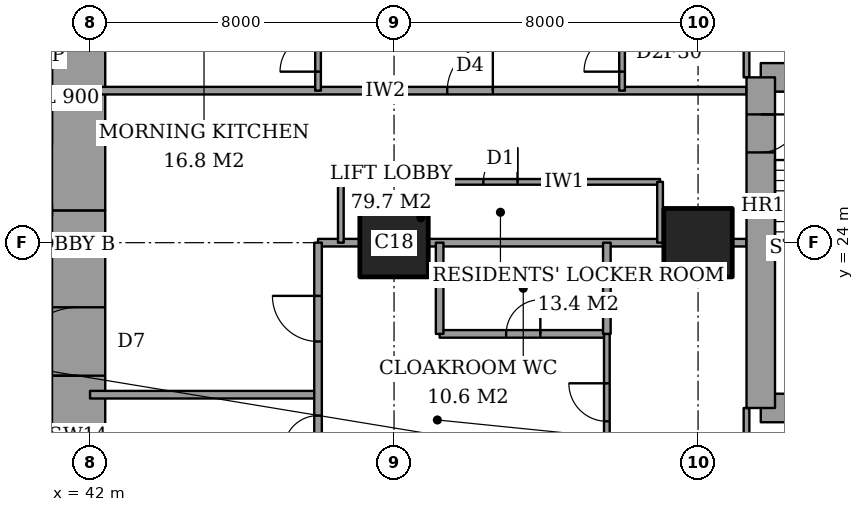
"""IFC4 building model, lengths in metres.
Left out: names, types, materials, properties, quantities, classifications, styles, units other than length and angle.
Written with IfcOpenShell. Run it as: python <this file> out.ifc"""

import sys

from ifc_helpers import new_model, si_unit, direction, frame, frame_2d, origin, origin_2d, place, context, subcontext, project, spatial, rectangle, extrude, element, fill, save


model = new_model("IFC4")
c1 = context("Model", 3, precision=1e-05, world=origin(), true_north=direction((0.0, 1.0)))
c2 = subcontext(c1, "Body", "Model", "MODEL_VIEW")
j1 = project(units=[si_unit("LENGTHUNIT", "METRE"), si_unit("PLANEANGLEUNIT", "RADIAN")], contexts=[c1])
p1 = place(None, origin())
s1 = spatial("IfcSite", under=j1, at=p1, CompositionType="ELEMENT")
p2 = place(p1, origin())
s2 = spatial("IfcBuilding", under=s1, at=p2, CompositionType="ELEMENT")
p3 = place(p2, frame((0.0, 0.0, 207.4)))
s3 = spatial("IfcBuildingStorey", under=s2, at=p3, CompositionType="ELEMENT", Elevation=207.4)
for number, where, z_axis, x_axis in (
    (1, (50.0, 24.0, 0.0), (0.0, 0.0, 1.0), (1.0, 0.0, 0.0)),
    (2, (58.0, 24.0, 0.0), (0.0, 0.0, 1.0), (1.0, 0.0, 0.0)),
):
    element("IfcColumn", number, at=place(p3, frame(where, z_axis=z_axis, x_axis=x_axis)), inside=s3, PredefinedType="COLUMN", context=c2, shape_type="SweptSolid", body=[
        extrude(rectangle(XDim=1.8, YDim=1.8, at=origin_2d()), origin(), (0.0, 0.0, 1.0), 3.6),
    ])
p4 = place(p3, frame((41.7, 13.0, 0.0), z_axis=(0.0, 0.0, 1.0), x_axis=(0.0, 1.0, 0.0)))
e3 = element("IfcWall", 3, at=p4, inside=s3, PredefinedType="SHEAR", context=c2, shape_type="SweptSolid", body=[
    extrude(rectangle(XDim=11.85, YDim=1.4, at=frame_2d((5.925, 0.0))), origin(), (0.0, 0.0, 1.0), 3.6),
])
p5 = place(p4, frame((7.5, 0.0, 0.0)))
e4 = element("IfcOpeningElement", 4, at=p5, cuts=e3, PredefinedType="OPENING", context=c2, shape_type="SweptSolid", body=[
    extrude(rectangle(XDim=1.8, YDim=2.4, at=frame_2d((0.9, 1.2))), frame((0.0, 0.71, 0.0), z_axis=(0.0, -1.0, 0.0), x_axis=(1.0, 0.0, 0.0)), (0.0, 0.0, 1.0), 1.42),
])
p6 = place(p3, frame((41.7, 24.85, 0.0), z_axis=(0.0, 0.0, 1.0), x_axis=(0.0, 1.0, 0.0)))
e5 = element("IfcWall", 5, at=p6, inside=s3, PredefinedType="SHEAR", context=c2, shape_type="SweptSolid", body=[
    extrude(rectangle(XDim=10.15, YDim=1.4, at=frame_2d((5.075, 0.0))), origin(), (0.0, 0.0, 1.0), 3.6),
])
for number, where, z_axis, x_axis in (
    (6, (59.65, 19.65, 0.0), (0.0, 0.0, 1.0), (1.0, 0.0, 0.0)),
    (7, (64.1, 28.35, 0.0), (0.0, 0.0, 1.0), (-1.0, 0.0, 0.0)),
):
    element("IfcWall", number, at=place(p3, frame(where, z_axis=z_axis, x_axis=x_axis)), inside=s3, PredefinedType="SHEAR", context=c2, shape_type="SweptSolid", body=[
        extrude(rectangle(XDim=4.45, YDim=0.75, at=frame_2d((2.225, 0.0))), origin(), (0.0, 0.0, 1.0), 3.6),
    ])
p7 = place(p3, frame((59.65, 28.35, 0.0), z_axis=(0.0, 0.0, 1.0), x_axis=(0.0, -1.0, 0.0)))
e8 = element("IfcWall", 8, at=p7, inside=s3, PredefinedType="SHEAR", context=c2, shape_type="SweptSolid", body=[
    extrude(rectangle(XDim=8.7, YDim=0.75, at=frame_2d((4.35, 0.0))), origin(), (0.0, 0.0, 1.0), 3.6),
])
p8 = place(p7, frame((0.975, 0.0, 0.0)))
e9 = element("IfcOpeningElement", 9, at=p8, cuts=e8, PredefinedType="OPENING", context=c2, shape_type="SweptSolid", body=[
    extrude(rectangle(XDim=1.0, YDim=2.1, at=frame_2d((0.5, 1.05))), frame((0.0, 0.385, 0.0), z_axis=(0.0, -1.0, 0.0), x_axis=(1.0, 0.0, 0.0)), (0.0, 0.0, 1.0), 0.77),
])
p9 = place(p3, frame((42.0, 20.0, 0.0), z_axis=(0.0, 0.0, 1.0), x_axis=(1.0, 0.0, 0.0)))
e10 = element("IfcWall", 10, at=p9, inside=s3, PredefinedType="PARTITIONING", context=c2, shape_type="SweptSolid", body=[
    extrude(rectangle(XDim=6.0, YDim=0.2, at=frame_2d((3.0, 0.0))), origin(), (0.0, 0.0, 1.0), 3.35),
])
p10 = place(p3, frame((51.2, 21.6, 0.0), z_axis=(0.0, 0.0, 1.0), x_axis=(1.0, 0.0, 0.0)))
e11 = element("IfcWall", 11, at=p10, inside=s3, PredefinedType="PARTITIONING", context=c2, shape_type="SweptSolid", body=[
    extrude(rectangle(XDim=4.4, YDim=0.2, at=frame_2d((2.2, 0.0))), origin(), (0.0, 0.0, 1.0), 3.35),
])
p11 = place(p10, frame((1.75, 0.0, 0.0)))
e12 = element("IfcOpeningElement", 12, at=p11, cuts=e11, PredefinedType="OPENING", context=c2, shape_type="SweptSolid", body=[
    extrude(rectangle(XDim=0.9, YDim=2.1, at=frame_2d((0.45, 1.05))), frame((0.0, 0.11, 0.0), z_axis=(0.0, -1.0, 0.0), x_axis=(1.0, 0.0, 0.0)), (0.0, 0.0, 1.0), 0.22),
])
p12 = place(p3, frame((48.0, 24.0, 0.0), z_axis=(0.0, 0.0, 1.0), x_axis=(1.0, 0.0, 0.0)))
e13 = element("IfcWall", 13, at=p12, inside=s3, PredefinedType="PARTITIONING", context=c2, shape_type="SweptSolid", body=[
    extrude(rectangle(XDim=1.1, YDim=0.2, at=frame_2d((0.55, 0.0))), origin(), (0.0, 0.0, 1.0), 3.35),
])
p13 = place(p3, frame((50.9, 24.0, 0.0), z_axis=(0.0, 0.0, 1.0), x_axis=(1.0, 0.0, 0.0)))
e14 = element("IfcWall", 14, at=p13, inside=s3, PredefinedType="PARTITIONING", context=c2, shape_type="SweptSolid", body=[
    extrude(rectangle(XDim=6.2, YDim=0.2, at=frame_2d((3.1, 0.0))), origin(), (0.0, 0.0, 1.0), 3.35),
])
p14 = place(p3, frame((58.9, 24.0, 0.0), z_axis=(0.0, 0.0, 1.0), x_axis=(1.0, 0.0, 0.0)))
e15 = element("IfcWall", 15, at=p14, inside=s3, PredefinedType="PARTITIONING", context=c2, shape_type="SweptSolid", body=[
    extrude(rectangle(XDim=0.375, YDim=0.2, at=frame_2d((0.188, 0.0))), origin(), (0.0, 0.0, 1.0), 3.35),
])
p15 = place(p3, frame((48.6, 25.6, 0.0), z_axis=(0.0, 0.0, 1.0), x_axis=(1.0, 0.0, 0.0)))
e16 = element("IfcWall", 16, at=p15, inside=s3, PredefinedType="PARTITIONING", context=c2, shape_type="SweptSolid", body=[
    extrude(rectangle(XDim=8.4, YDim=0.15, at=frame_2d((4.2, 0.0))), origin(), (0.0, 0.0, 1.0), 3.35),
])
p16 = place(p15, frame((3.75, 0.0, 0.0)))
e17 = element("IfcOpeningElement", 17, at=p16, cuts=e16, PredefinedType="OPENING", context=c2, shape_type="SweptSolid", body=[
    extrude(rectangle(XDim=0.9, YDim=2.1, at=frame_2d((0.45, 1.05))), frame((0.0, 0.085, 0.0), z_axis=(0.0, -1.0, 0.0), x_axis=(1.0, 0.0, 0.0)), (0.0, 0.0, 1.0), 0.17),
])
p17 = place(p3, frame((42.0, 28.0, 0.0), z_axis=(0.0, 0.0, 1.0), x_axis=(1.0, 0.0, 0.0)))
e18 = element("IfcWall", 18, at=p17, inside=s3, PredefinedType="PARTITIONING", context=c2, shape_type="SweptSolid", body=[
    extrude(rectangle(XDim=17.275, YDim=0.2, at=frame_2d((8.637, 0.0))), origin(), (0.0, 0.0, 1.0), 3.35),
])
p18 = place(p17, frame((9.4, 0.0, 0.0)))
e19 = element("IfcOpeningElement", 19, at=p18, cuts=e18, PredefinedType="OPENING", context=c2, shape_type="SweptSolid", body=[
    extrude(rectangle(XDim=1.2, YDim=2.4, at=frame_2d((0.6, 1.2))), frame((0.0, 0.11, 0.0), z_axis=(0.0, -1.0, 0.0), x_axis=(1.0, 0.0, 0.0)), (0.0, 0.0, 1.0), 0.22),
])
p19 = place(p3, frame((48.0, 18.0, 0.0), z_axis=(0.0, 0.0, 1.0), x_axis=(0.0, 1.0, 0.0)))
e20 = element("IfcWall", 20, at=p19, inside=s3, PredefinedType="PARTITIONING", context=c2, shape_type="SweptSolid", body=[
    extrude(rectangle(XDim=6.0, YDim=0.2, at=frame_2d((3.0, 0.0))), origin(), (0.0, 0.0, 1.0), 3.35),
])
p20 = place(p19, frame((3.4, 0.0, 0.0)))
e21 = element("IfcOpeningElement", 21, at=p20, cuts=e20, PredefinedType="OPENING", context=c2, shape_type="SweptSolid", body=[
    extrude(rectangle(XDim=1.2, YDim=2.4, at=frame_2d((0.6, 1.2))), frame((0.0, 0.11, 0.0), z_axis=(0.0, -1.0, 0.0), x_axis=(1.0, 0.0, 0.0)), (0.0, 0.0, 1.0), 0.22),
])
p21 = place(p19, frame((0.55, 0.0, 0.0)))
e22 = element("IfcOpeningElement", 22, at=p21, cuts=e20, PredefinedType="OPENING", context=c2, shape_type="SweptSolid", body=[
    extrude(rectangle(XDim=0.9, YDim=2.1, at=frame_2d((0.45, 1.05))), frame((0.0, 0.11, 0.0), z_axis=(0.0, -1.0, 0.0), x_axis=(1.0, 0.0, 0.0)), (0.0, 0.0, 1.0), 0.22),
])
p22 = place(p3, frame((48.0, 28.0, 0.0), z_axis=(0.0, 0.0, 1.0), x_axis=(0.0, 1.0, 0.0)))
e23 = element("IfcWall", 23, at=p22, inside=s3, PredefinedType="PARTITIONING", context=c2, shape_type="SweptSolid", body=[
    extrude(rectangle(XDim=9.2, YDim=0.15, at=frame_2d((4.6, 0.0))), origin(), (0.0, 0.0, 1.0), 3.35),
])
p23 = place(p22, frame((0.5, 0.0, 0.0)))
e24 = element("IfcOpeningElement", 24, at=p23, cuts=e23, PredefinedType="OPENING", context=c2, shape_type="SweptSolid", body=[
    extrude(rectangle(XDim=1.0, YDim=2.1, at=frame_2d((0.5, 1.05))), frame((0.0, 0.085, 0.0), z_axis=(0.0, -1.0, 0.0), x_axis=(1.0, 0.0, 0.0)), (0.0, 0.0, 1.0), 0.17),
])
p24 = place(p3, frame((48.6, 24.0, 0.0), z_axis=(0.0, 0.0, 1.0), x_axis=(0.0, 1.0, 0.0)))
e25 = element("IfcWall", 25, at=p24, inside=s3, PredefinedType="PARTITIONING", context=c2, shape_type="SweptSolid", body=[
    extrude(rectangle(XDim=1.6, YDim=0.15, at=frame_2d((0.8, 0.0))), origin(), (0.0, 0.0, 1.0), 3.35),
])
for number, where, z_axis, x_axis in (
    (26, (51.2, 21.6, 0.0), (0.0, 0.0, 1.0), (0.0, 1.0, 0.0)),
    (27, (55.6, 21.6, 0.0), (0.0, 0.0, 1.0), (0.0, 1.0, 0.0)),
):
    element("IfcWall", number, at=place(p3, frame(where, z_axis=z_axis, x_axis=x_axis)), inside=s3, PredefinedType="PARTITIONING", context=c2, shape_type="SweptSolid", body=[
        extrude(rectangle(XDim=2.4, YDim=0.2, at=frame_2d((1.2, 0.0))), origin(), (0.0, 0.0, 1.0), 3.35),
    ])
p25 = place(p3, frame((55.6, 14.6, 0.0), z_axis=(0.0, 0.0, 1.0), x_axis=(0.0, 1.0, 0.0)))
e28 = element("IfcWall", 28, at=p25, inside=s3, PredefinedType="PARTITIONING", context=c2, shape_type="SweptSolid", body=[
    extrude(rectangle(XDim=7.0, YDim=0.15, at=frame_2d((3.5, 0.0))), origin(), (0.0, 0.0, 1.0), 3.35),
])
p26 = place(p25, frame((4.7, 0.0, 0.0)))
e29 = element("IfcOpeningElement", 29, at=p26, cuts=e28, PredefinedType="OPENING", context=c2, shape_type="SweptSolid", body=[
    extrude(rectangle(XDim=1.0, YDim=2.1, at=frame_2d((0.5, 1.05))), frame((0.0, 0.085, 0.0), z_axis=(0.0, -1.0, 0.0), x_axis=(1.0, 0.0, 0.0)), (0.0, 0.0, 1.0), 0.17),
])
p27 = place(p3, frame((56.0, 28.0, 0.0), z_axis=(0.0, 0.0, 1.0), x_axis=(0.0, 1.0, 0.0)))
e30 = element("IfcWall", 30, at=p27, inside=s3, PredefinedType="PARTITIONING", context=c2, shape_type="SweptSolid", body=[
    extrude(rectangle(XDim=9.2, YDim=0.15, at=frame_2d((4.6, 0.0))), origin(), (0.0, 0.0, 1.0), 3.35),
])
p28 = place(p27, frame((0.5, 0.0, 0.0)))
e31 = element("IfcOpeningElement", 31, at=p28, cuts=e30, PredefinedType="OPENING", context=c2, shape_type="SweptSolid", body=[
    extrude(rectangle(XDim=1.0, YDim=2.1, at=frame_2d((0.5, 1.05))), frame((0.0, 0.085, 0.0), z_axis=(0.0, -1.0, 0.0), x_axis=(1.0, 0.0, 0.0)), (0.0, 0.0, 1.0), 0.17),
])
p29 = place(p3, frame((57.0, 24.0, 0.0), z_axis=(0.0, 0.0, 1.0), x_axis=(0.0, 1.0, 0.0)))
e32 = element("IfcWall", 32, at=p29, inside=s3, PredefinedType="PARTITIONING", context=c2, shape_type="SweptSolid", body=[
    extrude(rectangle(XDim=1.6, YDim=0.15, at=frame_2d((0.8, 0.0))), origin(), (0.0, 0.0, 1.0), 3.35),
])
p30 = place(p3, frame((59.275, 17.2, 0.0), z_axis=(0.0, 0.0, 1.0), x_axis=(0.0, 1.0, 0.0)))
e33 = element("IfcWall", 33, at=p30, inside=s3, PredefinedType="PARTITIONING", context=c2, shape_type="SweptSolid", body=[
    extrude(rectangle(XDim=2.45, YDim=0.15, at=frame_2d((1.225, 0.0))), origin(), (0.0, 0.0, 1.0), 3.35),
])
p31 = place(p30, frame((0.538, 0.0, 0.0)))
e34 = element("IfcOpeningElement", 34, at=p31, cuts=e33, PredefinedType="OPENING", context=c2, shape_type="SweptSolid", body=[
    extrude(rectangle(XDim=1.0, YDim=2.1, at=frame_2d((0.5, 1.05))), frame((0.0, 0.085, 0.0), z_axis=(0.0, -1.0, 0.0), x_axis=(1.0, 0.0, 0.0)), (0.0, 0.0, 1.0), 0.17),
])
p32 = place(p3, frame((59.275, 28.35, 0.0), z_axis=(0.0, 0.0, 1.0), x_axis=(0.0, 1.0, 0.0)))
e35 = element("IfcWall", 35, at=p32, inside=s3, PredefinedType="PARTITIONING", context=c2, shape_type="SweptSolid", body=[
    extrude(rectangle(XDim=2.45, YDim=0.15, at=frame_2d((1.225, 0.0))), origin(), (0.0, 0.0, 1.0), 3.35),
])
p33 = place(p32, frame((0.913, 0.0, 0.0)))
e36 = element("IfcOpeningElement", 36, at=p33, cuts=e35, PredefinedType="OPENING", context=c2, shape_type="SweptSolid", body=[
    extrude(rectangle(XDim=1.0, YDim=2.1, at=frame_2d((0.5, 1.05))), frame((0.0, 0.085, 0.0), z_axis=(0.0, -1.0, 0.0), x_axis=(1.0, 0.0, 0.0)), (0.0, 0.0, 1.0), 0.17),
])
p34 = place(p26, origin())
e37 = element("IfcDoor", 37, at=p34, inside=s3, OperationType="SINGLE_SWING_LEFT", PredefinedType="DOOR", context=c2, shape_type="SweptSolid", body=[
    extrude(rectangle(XDim=1.0, YDim=2.1, at=frame_2d((0.5, 1.05))), frame((0.0, 0.025, 0.0), z_axis=(0.0, -1.0, 0.0), x_axis=(1.0, 0.0, 0.0)), (0.0, 0.0, 1.0), 0.05),
])
fill(e29, e37)
p35 = place(p11, origin())
e38 = element("IfcDoor", 38, at=p35, inside=s3, OperationType="SINGLE_SWING_LEFT", PredefinedType="DOOR", context=c2, shape_type="SweptSolid", body=[
    extrude(rectangle(XDim=0.9, YDim=2.1, at=frame_2d((0.45, 1.05))), frame((0.0, 0.025, 0.0), z_axis=(0.0, -1.0, 0.0), x_axis=(1.0, 0.0, 0.0)), (0.0, 0.0, 1.0), 0.05),
])
fill(e12, e38)
p36 = place(p20, origin())
e39 = element("IfcDoor", 39, at=p36, inside=s3, OperationType="SINGLE_SWING_LEFT", PredefinedType="DOOR", context=c2, shape_type="SweptSolid", body=[
    extrude(rectangle(XDim=1.2, YDim=2.4, at=frame_2d((0.6, 1.2))), frame((0.0, 0.025, 0.0), z_axis=(0.0, -1.0, 0.0), x_axis=(1.0, 0.0, 0.0)), (0.0, 0.0, 1.0), 0.05),
])
fill(e21, e39)
p37 = place(p21, origin())
e40 = element("IfcDoor", 40, at=p37, inside=s3, OperationType="SINGLE_SWING_RIGHT", PredefinedType="DOOR", context=c2, shape_type="SweptSolid", body=[
    extrude(rectangle(XDim=0.9, YDim=2.1, at=frame_2d((0.45, 1.05))), frame((0.0, 0.025, 0.0), z_axis=(0.0, -1.0, 0.0), x_axis=(1.0, 0.0, 0.0)), (0.0, 0.0, 1.0), 0.05),
])
fill(e22, e40)
p38 = place(p28, origin())
e41 = element("IfcDoor", 41, at=p38, inside=s3, OperationType="SINGLE_SWING_RIGHT", PredefinedType="DOOR", context=c2, shape_type="SweptSolid", body=[
    extrude(rectangle(XDim=1.0, YDim=2.1, at=frame_2d((0.5, 1.05))), frame((0.0, 0.025, 0.0), z_axis=(0.0, -1.0, 0.0), x_axis=(1.0, 0.0, 0.0)), (0.0, 0.0, 1.0), 0.05),
])
fill(e31, e41)
p39 = place(p18, origin())
e42 = element("IfcDoor", 42, at=p39, inside=s3, OperationType="SINGLE_SWING_LEFT", PredefinedType="DOOR", context=c2, shape_type="SweptSolid", body=[
    extrude(rectangle(XDim=1.2, YDim=2.4, at=frame_2d((0.6, 1.2))), frame((0.0, 0.025, 0.0), z_axis=(0.0, -1.0, 0.0), x_axis=(1.0, 0.0, 0.0)), (0.0, 0.0, 1.0), 0.05),
])
fill(e19, e42)
p40 = place(p23, origin())
e43 = element("IfcDoor", 43, at=p40, inside=s3, OperationType="SINGLE_SWING_RIGHT", PredefinedType="DOOR", context=c2, shape_type="SweptSolid", body=[
    extrude(rectangle(XDim=1.0, YDim=2.1, at=frame_2d((0.5, 1.05))), frame((0.0, 0.025, 0.0), z_axis=(0.0, -1.0, 0.0), x_axis=(1.0, 0.0, 0.0)), (0.0, 0.0, 1.0), 0.05),
])
fill(e24, e43)
p41 = place(p16, origin())
e44 = element("IfcDoor", 44, at=p41, inside=s3, OperationType="SINGLE_SWING_LEFT", PredefinedType="DOOR", context=c2, shape_type="SweptSolid", body=[
    extrude(rectangle(XDim=0.9, YDim=2.1, at=frame_2d((0.45, 1.05))), frame((0.0, 0.025, 0.0), z_axis=(0.0, -1.0, 0.0), x_axis=(1.0, 0.0, 0.0)), (0.0, 0.0, 1.0), 0.05),
])
fill(e17, e44)
p42 = place(p5, origin())
e45 = element("IfcDoor", 45, at=p42, inside=s3, OperationType="DOUBLE_DOOR_DOUBLE_SWING", PredefinedType="DOOR", context=c2, shape_type="SweptSolid", body=[
    extrude(rectangle(XDim=1.8, YDim=2.4, at=frame_2d((0.9, 1.2))), frame((0.0, 0.025, 0.0), z_axis=(0.0, -1.0, 0.0), x_axis=(1.0, 0.0, 0.0)), (0.0, 0.0, 1.0), 0.05),
])
fill(e4, e45)
p43 = place(p8, origin())
e46 = element("IfcDoor", 46, at=p43, inside=s3, OperationType="SINGLE_SWING_RIGHT", PredefinedType="DOOR", context=c2, shape_type="SweptSolid", body=[
    extrude(rectangle(XDim=1.0, YDim=2.1, at=frame_2d((0.5, 1.05))), frame((0.0, 0.025, 0.0), z_axis=(0.0, -1.0, 0.0), x_axis=(1.0, 0.0, 0.0)), (0.0, 0.0, 1.0), 0.05),
])
fill(e9, e46)
save(model, sys.argv[1])
